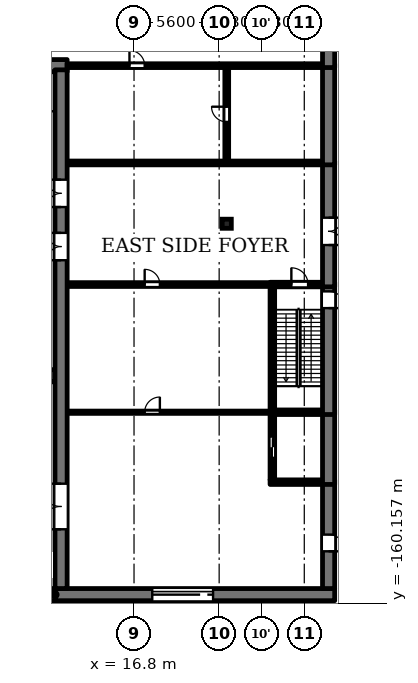
"""IFC4 building model, lengths in metres.
Left out: names, types, materials, properties, quantities, classifications, styles, units other than length and angle.
Written with IfcOpenShell. Run it as: python <this file> out.ifc"""

import sys

from ifc_helpers import new_model, si_unit, direction, frame, frame_2d, origin, origin_2d, place, context, subcontext, project, spatial, rectangle, extrude, element, fill, save


model = new_model("IFC4")
c1 = context("Model", 3, precision=1e-05, world=origin(), true_north=direction((0.0, 1.0)))
c2 = subcontext(c1, "Body", "Model", "MODEL_VIEW")
j1 = project(units=[si_unit("LENGTHUNIT", "METRE"), si_unit("PLANEANGLEUNIT", "RADIAN")], contexts=[c1])
p1 = place(None, origin())
s1 = spatial("IfcSite", under=j1, at=p1, CompositionType="ELEMENT")
p2 = place(p1, origin())
s2 = spatial("IfcBuilding", under=s1, at=p2, CompositionType="ELEMENT")
p3 = place(p2, origin())
s3 = spatial("IfcBuildingStorey", under=s2, at=p3, CompositionType="ELEMENT", Elevation=0.0)
p4 = place(p3, frame((22.9, -135.2, 0.0), z_axis=(0.0, 0.0, 1.0), x_axis=(1.0, 0.0, 0.0)))
e1 = element("IfcColumn", 1, at=p4, inside=s3, PredefinedType="COLUMN", context=c2, shape_type="SweptSolid", body=[
    extrude(rectangle(XDim=0.6, YDim=0.6, at=origin_2d()), origin(), (0.0, 0.0, 1.0), 6.15),
])
p5 = place(p3, frame((-12.4, -159.6, 0.0), z_axis=(0.0, 0.0, 1.0), x_axis=(1.0, 0.0, 0.0)))
e2 = element("IfcWall", 2, at=p5, inside=s3, PredefinedType="SOLIDWALL", context=c2, shape_type="SweptSolid", body=[
    extrude(rectangle(XDim=24.8, YDim=0.8, at=frame_2d((12.4, 0.0))), origin(), (0.0, 0.0, 1.0), 6.5),
])
p6 = place(p3, frame((11.6, -159.6, 0.0), z_axis=(0.0, 0.0, 1.0), x_axis=(1.0, 0.0, 0.0)))
e3 = element("IfcWall", 3, at=p6, inside=s3, PredefinedType="SOLIDWALL", context=c2, shape_type="SweptSolid", body=[
    extrude(rectangle(XDim=18.4, YDim=0.8, at=frame_2d((9.2, 0.0))), origin(), (0.0, 0.0, 1.0), 6.15),
])
p7 = place(p6, frame((6.4, 0.0, 0.0)))
e4 = element("IfcOpeningElement", 4, at=p7, cuts=e3, PredefinedType="OPENING", context=c2, shape_type="SweptSolid", body=[
    extrude(rectangle(XDim=4.0, YDim=4.5, at=frame_2d((2.0, 2.25))), frame((0.0, 0.41, 0.0), z_axis=(0.0, -1.0, 0.0), x_axis=(1.0, 0.0, 0.0)), (0.0, 0.0, 1.0), 0.82),
])
p8 = place(p3, frame((25.75, -152.2, 0.0), z_axis=(0.0, 0.0, 1.0), x_axis=(1.0, 0.0, 0.0)))
e5 = element("IfcWall", 5, at=p8, inside=s3, PredefinedType="SOLIDWALL", context=c2, shape_type="SweptSolid", body=[
    extrude(rectangle(XDim=3.45, YDim=0.3, at=frame_2d((1.725, 0.0))), origin(), (0.0, 0.0, 1.0), 6.15),
])
p9 = place(p3, frame((12.4, -147.6, 0.0), z_axis=(0.0, 0.0, 1.0), x_axis=(1.0, 0.0, 0.0)))
e6 = element("IfcWall", 6, at=p9, inside=s3, PredefinedType="PARTITIONING", context=c2, shape_type="SweptSolid", body=[
    extrude(rectangle(XDim=13.35, YDim=0.15, at=frame_2d((6.675, 0.0))), origin(), (0.0, 0.0, 1.0), 6.15),
])
p10 = place(p9, frame((5.1, 0.0, 0.0)))
e7 = element("IfcOpeningElement", 7, at=p10, cuts=e6, PredefinedType="OPENING", context=c2, shape_type="SweptSolid", body=[
    extrude(rectangle(XDim=1.0, YDim=2.1, at=frame_2d((0.5, 1.05))), frame((0.0, 0.085, 0.0), z_axis=(0.0, -1.0, 0.0), x_axis=(1.0, 0.0, 0.0)), (0.0, 0.0, 1.0), 0.17),
])
p11 = place(p3, frame((26.05, -147.6, 0.0), z_axis=(0.0, 0.0, 1.0), x_axis=(1.0, 0.0, 0.0)))
e8 = element("IfcWall", 8, at=p11, inside=s3, PredefinedType="SOLIDWALL", context=c2, shape_type="SweptSolid", body=[
    extrude(rectangle(XDim=3.15, YDim=0.3, at=frame_2d((1.575, 0.0))), origin(), (0.0, 0.0, 1.0), 6.15),
])
p12 = place(p3, frame((7.0, -145.2, 0.0), z_axis=(0.0, 0.0, 1.0), x_axis=(1.0, 0.0, 0.0)))
e9 = element("IfcWall", 9, at=p12, inside=s3, PredefinedType="SOLIDWALL", context=c2, shape_type="SweptSolid", body=[
    extrude(rectangle(XDim=4.6, YDim=0.8, at=frame_2d((2.3, 0.0))), origin(), (0.0, 0.0, 1.0), 6.5),
])
p13 = place(p3, frame((12.4, -139.2, 0.0), z_axis=(0.0, 0.0, 1.0), x_axis=(1.0, 0.0, 0.0)))
e10 = element("IfcWall", 10, at=p13, inside=s3, PredefinedType="SOLIDWALL", context=c2, shape_type="SweptSolid", body=[
    extrude(rectangle(XDim=13.35, YDim=0.25, at=frame_2d((6.675, 0.0))), origin(), (0.0, 0.0, 1.0), 6.15),
])
p14 = place(p13, frame((5.1, 0.0, 0.0)))
e11 = element("IfcOpeningElement", 11, at=p14, cuts=e10, PredefinedType="OPENING", context=c2, shape_type="SweptSolid", body=[
    extrude(rectangle(XDim=1.0, YDim=2.1, at=frame_2d((0.5, 1.05))), frame((0.0, 0.135, 0.0), z_axis=(0.0, -1.0, 0.0), x_axis=(1.0, 0.0, 0.0)), (0.0, 0.0, 1.0), 0.27),
])
p15 = place(p3, frame((25.75, -139.2, 0.0), z_axis=(0.0, 0.0, 1.0), x_axis=(1.0, 0.0, 0.0)))
e12 = element("IfcWall", 12, at=p15, inside=s3, PredefinedType="SOLIDWALL", context=c2, shape_type="SweptSolid", body=[
    extrude(rectangle(XDim=3.45, YDim=0.3, at=frame_2d((1.725, 0.0))), origin(), (0.0, 0.0, 1.0), 6.15),
])
p16 = place(p15, frame((1.4, 0.0, 0.0)))
e13 = element("IfcOpeningElement", 13, at=p16, cuts=e12, PredefinedType="OPENING", context=c2, shape_type="SweptSolid", body=[
    extrude(rectangle(XDim=1.1, YDim=2.1, at=frame_2d((0.55, 1.05))), frame((0.0, 0.16, 0.0), z_axis=(0.0, -1.0, 0.0), x_axis=(1.0, 0.0, 0.0)), (0.0, 0.0, 1.0), 0.32),
])
p17 = place(p3, frame((12.4, -131.2, 0.0), z_axis=(0.0, 0.0, 1.0), x_axis=(1.0, 0.0, 0.0)))
e14 = element("IfcWall", 14, at=p17, inside=s3, PredefinedType="SOLIDWALL", context=c2, shape_type="SweptSolid", body=[
    extrude(rectangle(XDim=16.8, YDim=0.25, at=frame_2d((8.4, 0.0))), origin(), (0.0, 0.0, 1.0), 6.15),
])
p18 = place(p3, frame((-12.4, -124.8, 0.0), z_axis=(0.0, 0.0, 1.0), x_axis=(1.0, 0.0, 0.0)))
e15 = element("IfcWall", 15, at=p18, inside=s3, PredefinedType="SOLIDWALL", context=c2, shape_type="SweptSolid", body=[
    extrude(rectangle(XDim=24.8, YDim=0.8, at=frame_2d((12.4, 0.0))), origin(), (0.0, 0.0, 1.0), 6.5),
])
p19 = place(p18, frame((2.5, 0.0, 0.0)))
e16 = element("IfcOpeningElement", 16, at=p19, cuts=e15, PredefinedType="OPENING", context=c2, shape_type="SweptSolid", body=[
    extrude(rectangle(XDim=1.8, YDim=2.2, at=frame_2d((0.9, 1.1))), frame((0.0, 0.41, 0.0), z_axis=(0.0, -1.0, 0.0), x_axis=(1.0, 0.0, 0.0)), (0.0, 0.0, 1.0), 0.82),
])
p20 = place(p18, frame((8.5, 0.0, 0.0)))
e17 = element("IfcOpeningElement", 17, at=p20, cuts=e15, PredefinedType="OPENING", context=c2, shape_type="SweptSolid", body=[
    extrude(rectangle(XDim=1.8, YDim=2.2, at=frame_2d((0.9, 1.1))), frame((0.0, 0.41, 0.0), z_axis=(0.0, -1.0, 0.0), x_axis=(1.0, 0.0, 0.0)), (0.0, 0.0, 1.0), 0.82),
])
p21 = place(p18, frame((14.5, 0.0, 0.0)))
e18 = element("IfcOpeningElement", 18, at=p21, cuts=e15, PredefinedType="OPENING", context=c2, shape_type="SweptSolid", body=[
    extrude(rectangle(XDim=1.8, YDim=2.2, at=frame_2d((0.9, 1.1))), frame((0.0, 0.41, 0.0), z_axis=(0.0, -1.0, 0.0), x_axis=(1.0, 0.0, 0.0)), (0.0, 0.0, 1.0), 0.82),
])
p22 = place(p18, frame((20.5, 0.0, 0.0)))
e19 = element("IfcOpeningElement", 19, at=p22, cuts=e15, PredefinedType="OPENING", context=c2, shape_type="SweptSolid", body=[
    extrude(rectangle(XDim=1.8, YDim=2.2, at=frame_2d((0.9, 1.1))), frame((0.0, 0.41, 0.0), z_axis=(0.0, -1.0, 0.0), x_axis=(1.0, 0.0, 0.0)), (0.0, 0.0, 1.0), 0.82),
])
p23 = place(p3, frame((12.4, -124.8, 0.0), z_axis=(0.0, 0.0, 1.0), x_axis=(1.0, 0.0, 0.0)))
e20 = element("IfcWall", 20, at=p23, inside=s3, PredefinedType="SOLIDWALL", context=c2, shape_type="SweptSolid", body=[
    extrude(rectangle(XDim=16.8, YDim=0.25, at=frame_2d((8.4, 0.0))), origin(), (0.0, 0.0, 1.0), 6.15),
])
p24 = place(p23, frame((4.1, 0.0, 0.0)))
e21 = element("IfcOpeningElement", 21, at=p24, cuts=e20, PredefinedType="OPENING", context=c2, shape_type="SweptSolid", body=[
    extrude(rectangle(XDim=1.0, YDim=2.1, at=frame_2d((0.5, 1.05))), frame((0.0, 0.135, 0.0), z_axis=(0.0, -1.0, 0.0), x_axis=(1.0, 0.0, 0.0)), (0.0, 0.0, 1.0), 0.27),
])
p25 = place(p3, frame((12.0, -159.2, 0.0), z_axis=(0.0, 0.0, 1.0), x_axis=(0.0, 1.0, 0.0)))
e22 = element("IfcWall", 22, at=p25, inside=s3, PredefinedType="SOLIDWALL", context=c2, shape_type="SweptSolid", body=[
    extrude(rectangle(XDim=34.125, YDim=0.8, at=frame_2d((17.062, 0.0))), origin(), (0.0, 0.0, 1.0), 6.5),
])
p26 = place(p25, frame((21.6, 0.0, 0.0)))
e23 = element("IfcOpeningElement", 23, at=p26, cuts=e22, PredefinedType="OPENING", context=c2, shape_type="SweptSolid", body=[
    extrude(rectangle(XDim=1.8, YDim=2.2, at=frame_2d((0.9, 1.1))), frame((0.0, 0.41, 0.0), z_axis=(0.0, -1.0, 0.0), x_axis=(1.0, 0.0, 0.0)), (0.0, 0.0, 1.0), 0.82),
])
p27 = place(p25, frame((25.1, 0.0, 0.0)))
e24 = element("IfcOpeningElement", 24, at=p27, cuts=e22, PredefinedType="OPENING", context=c2, shape_type="SweptSolid", body=[
    extrude(rectangle(XDim=1.8, YDim=2.2, at=frame_2d((0.9, 1.1))), frame((0.0, 0.41, 0.0), z_axis=(0.0, -1.0, 0.0), x_axis=(1.0, 0.0, 0.0)), (0.0, 0.0, 1.0), 0.82),
])
p28 = place(p25, frame((3.9, 0.0, 0.0)))
e25 = element("IfcOpeningElement", 25, at=p28, cuts=e22, PredefinedType="OPENING", context=c2, shape_type="SweptSolid", body=[
    extrude(rectangle(XDim=3.0, YDim=3.0, at=frame_2d((1.5, 1.5))), frame((0.0, 0.41, 0.0), z_axis=(0.0, -1.0, 0.0), x_axis=(1.0, 0.0, 0.0)), (0.0, 0.0, 1.0), 0.82),
])
p29 = place(p3, frame((22.9, -131.075, 0.0), z_axis=(0.0, 0.0, 1.0), x_axis=(0.0, 1.0, 0.0)))
e26 = element("IfcWall", 26, at=p29, inside=s3, PredefinedType="SOLIDWALL", context=c2, shape_type="SweptSolid", body=[
    extrude(rectangle(XDim=6.15, YDim=0.25, at=frame_2d((3.075, 0.0))), origin(), (0.0, 0.0, 1.0), 6.15),
])
p30 = place(p29, frame((2.575, 0.0, 0.0)))
e27 = element("IfcOpeningElement", 27, at=p30, cuts=e26, PredefinedType="OPENING", context=c2, shape_type="SweptSolid", body=[
    extrude(rectangle(XDim=1.0, YDim=2.1, at=frame_2d((0.5, 1.05))), frame((0.0, 0.135, 0.0), z_axis=(0.0, -1.0, 0.0), x_axis=(1.0, 0.0, 0.0)), (0.0, 0.0, 1.0), 0.27),
])
p31 = place(p3, frame((25.9, -152.05, 0.0), z_axis=(0.0, 0.0, 1.0), x_axis=(0.0, 1.0, 0.0)))
e28 = element("IfcWall", 28, at=p31, inside=s3, PredefinedType="SOLIDWALL", context=c2, shape_type="SweptSolid", body=[
    extrude(rectangle(XDim=12.825, YDim=0.3, at=frame_2d((6.413, 0.0))), origin(), (0.0, 0.0, 1.0), 6.15),
])
p32 = place(p31, frame((1.45, 0.0, 0.0)))
e29 = element("IfcOpeningElement", 29, at=p32, cuts=e28, PredefinedType="OPENING", context=c2, shape_type="SweptSolid", body=[
    extrude(rectangle(XDim=1.4, YDim=2.2, at=frame_2d((0.7, 1.1))), frame((0.0, 0.16, 0.0), z_axis=(0.0, -1.0, 0.0), x_axis=(1.0, 0.0, 0.0)), (0.0, 0.0, 1.0), 0.32),
])
p33 = place(p3, frame((29.6, -152.05, 0.0), z_axis=(0.0, 0.0, 1.0), x_axis=(0.0, -1.0, 0.0)))
e30 = element("IfcWall", 30, at=p33, inside=s3, PredefinedType="SOLIDWALL", context=c2, shape_type="SweptSolid", body=[
    extrude(rectangle(XDim=7.15, YDim=0.8, at=frame_2d((3.575, 0.0))), origin(), (0.0, 0.0, 1.0), 6.15),
])
p34 = place(p33, frame((3.6, 0.0, 0.0)))
e31 = element("IfcOpeningElement", 31, at=p34, cuts=e30, PredefinedType="OPENING", context=c2, shape_type="SweptSolid", body=[
    extrude(rectangle(XDim=1.1, YDim=2.1, at=frame_2d((0.55, 1.05))), frame((0.0, 0.41, 0.0), z_axis=(0.0, -1.0, 0.0), x_axis=(1.0, 0.0, 0.0)), (0.0, 0.0, 1.0), 0.82),
])
p35 = place(p3, frame((29.6, -147.45, 0.0), z_axis=(0.0, 0.0, 1.0), x_axis=(0.0, -1.0, 0.0)))
e32 = element("IfcWall", 32, at=p35, inside=s3, PredefinedType="SOLIDWALL", context=c2, shape_type="SweptSolid", body=[
    extrude(rectangle(XDim=4.9, YDim=0.8, at=frame_2d((2.45, 0.0))), origin(), (0.0, 0.0, 1.0), 6.15),
])
p36 = place(p3, frame((29.6, -139.05, 0.0), z_axis=(0.0, 0.0, 1.0), x_axis=(0.0, -1.0, 0.0)))
e33 = element("IfcWall", 33, at=p36, inside=s3, PredefinedType="SOLIDWALL", context=c2, shape_type="SweptSolid", body=[
    extrude(rectangle(XDim=8.7, YDim=0.8, at=frame_2d((4.35, 0.0))), origin(), (0.0, 0.0, 1.0), 6.15),
])
p37 = place(p36, frame((0.6, 0.0, 0.0)))
e34 = element("IfcOpeningElement", 34, at=p37, cuts=e33, PredefinedType="OPENING", context=c2, shape_type="SweptSolid", body=[
    extrude(rectangle(XDim=1.1, YDim=2.1, at=frame_2d((0.55, 1.05))), frame((0.0, 0.41, 0.0), z_axis=(0.0, -1.0, 0.0), x_axis=(1.0, 0.0, 0.0)), (0.0, 0.0, 1.0), 0.82),
])
p38 = place(p3, frame((29.6, -131.075, 0.0), z_axis=(0.0, 0.0, 1.0), x_axis=(0.0, -1.0, 0.0)))
e35 = element("IfcWall", 35, at=p38, inside=s3, PredefinedType="SOLIDWALL", context=c2, shape_type="SweptSolid", body=[
    extrude(rectangle(XDim=8.275, YDim=0.8, at=frame_2d((4.137, 0.0))), origin(), (0.0, 0.0, 1.0), 6.15),
])
p39 = place(p38, frame((3.725, 0.0, 0.0)))
e36 = element("IfcOpeningElement", 36, at=p39, cuts=e35, PredefinedType="OPENING", context=c2, shape_type="SweptSolid", body=[
    extrude(rectangle(XDim=1.8, YDim=2.1, at=frame_2d((0.9, 1.05))), frame((0.0, 0.41, 0.0), z_axis=(0.0, -1.0, 0.0), x_axis=(1.0, 0.0, 0.0)), (0.0, 0.0, 1.0), 0.82),
])
p40 = place(p3, frame((29.6, -124.675, 0.0), z_axis=(0.0, 0.0, 1.0), x_axis=(0.0, -1.0, 0.0)))
e37 = element("IfcWall", 37, at=p40, inside=s3, PredefinedType="SOLIDWALL", context=c2, shape_type="SweptSolid", body=[
    extrude(rectangle(XDim=6.65, YDim=0.8, at=frame_2d((3.325, 0.0))), origin(), (0.0, 0.0, 1.0), 6.15),
])
p41 = place(p3, frame((29.6, -121.05, 0.0), z_axis=(0.0, 0.0, 1.0), x_axis=(0.0, -1.0, 0.0)))
e38 = element("IfcWall", 38, at=p41, inside=s3, PredefinedType="SOLIDWALL", context=c2, shape_type="SweptSolid", body=[
    extrude(rectangle(XDim=3.875, YDim=0.8, at=frame_2d((1.938, 0.0))), origin(), (0.0, 0.0, 1.0), 6.15),
])
p42 = place(p37, origin())
e39 = element("IfcDoor", 39, at=p42, inside=s3, OperationType="SINGLE_SWING_RIGHT", PredefinedType="DOOR", context=c2, shape_type="SweptSolid", body=[
    extrude(rectangle(XDim=1.1, YDim=2.1, at=frame_2d((0.55, 1.05))), frame((0.0, 0.025, 0.0), z_axis=(0.0, -1.0, 0.0), x_axis=(1.0, 0.0, 0.0)), (0.0, 0.0, 1.0), 0.05),
])
fill(e34, e39)
p43 = place(p39, origin())
e40 = element("IfcDoor", 40, at=p43, inside=s3, OperationType="DOUBLE_DOOR_SINGLE_SWING", PredefinedType="DOOR", context=c2, shape_type="SweptSolid", body=[
    extrude(rectangle(XDim=1.8, YDim=2.1, at=frame_2d((0.9, 1.05))), frame((0.0, 0.025, 0.0), z_axis=(0.0, -1.0, 0.0), x_axis=(1.0, 0.0, 0.0)), (0.0, 0.0, 1.0), 0.05),
])
fill(e36, e40)
p44 = place(p7, origin())
e41 = element("IfcDoor", 41, at=p44, inside=s3, OperationType="ROLLINGUP", PredefinedType="DOOR", context=c2, shape_type="SweptSolid", body=[
    extrude(rectangle(XDim=4.0, YDim=4.5, at=frame_2d((2.0, 2.25))), frame((0.0, 0.025, 0.0), z_axis=(0.0, -1.0, 0.0), x_axis=(1.0, 0.0, 0.0)), (0.0, 0.0, 1.0), 0.05),
])
fill(e4, e41)
p45 = place(p34, origin())
e42 = element("IfcDoor", 42, at=p45, inside=s3, OperationType="SINGLE_SWING_RIGHT", PredefinedType="DOOR", context=c2, shape_type="SweptSolid", body=[
    extrude(rectangle(XDim=1.1, YDim=2.1, at=frame_2d((0.55, 1.05))), frame((0.0, 0.025, 0.0), z_axis=(0.0, -1.0, 0.0), x_axis=(1.0, 0.0, 0.0)), (0.0, 0.0, 1.0), 0.05),
])
fill(e31, e42)
p46 = place(p32, origin())
e43 = element("IfcDoor", 43, at=p46, inside=s3, OperationType="DOUBLE_DOOR_SLIDING", PredefinedType="DOOR", context=c2, shape_type="SweptSolid", body=[
    extrude(rectangle(XDim=1.4, YDim=2.2, at=frame_2d((0.7, 1.1))), frame((0.0, 0.025, 0.0), z_axis=(0.0, -1.0, 0.0), x_axis=(1.0, 0.0, 0.0)), (0.0, 0.0, 1.0), 0.05),
])
fill(e29, e43)
p47 = place(p16, origin())
e44 = element("IfcDoor", 44, at=p47, inside=s3, OperationType="SINGLE_SWING_LEFT", PredefinedType="DOOR", context=c2, shape_type="SweptSolid", body=[
    extrude(rectangle(XDim=1.1, YDim=2.1, at=frame_2d((0.55, 1.05))), frame((0.0, 0.025, 0.0), z_axis=(0.0, -1.0, 0.0), x_axis=(1.0, 0.0, 0.0)), (0.0, 0.0, 1.0), 0.05),
])
fill(e13, e44)
p48 = place(p24, origin())
e45 = element("IfcDoor", 45, at=p48, inside=s3, OperationType="SINGLE_SWING_LEFT", PredefinedType="DOOR", context=c2, shape_type="SweptSolid", body=[
    extrude(rectangle(XDim=1.0, YDim=2.1, at=frame_2d((0.5, 1.05))), frame((0.0, 0.025, 0.0), z_axis=(0.0, -1.0, 0.0), x_axis=(1.0, 0.0, 0.0)), (0.0, 0.0, 1.0), 0.05),
])
fill(e21, e45)
p49 = place(p30, origin())
e46 = element("IfcDoor", 46, at=p49, inside=s3, OperationType="SINGLE_SWING_RIGHT", PredefinedType="DOOR", context=c2, shape_type="SweptSolid", body=[
    extrude(rectangle(XDim=1.0, YDim=2.1, at=frame_2d((0.5, 1.05))), frame((0.0, 0.025, 0.0), z_axis=(0.0, -1.0, 0.0), x_axis=(1.0, 0.0, 0.0)), (0.0, 0.0, 1.0), 0.05),
])
fill(e27, e46)
p50 = place(p26, origin())
e47 = element("IfcDoor", 47, at=p50, inside=s3, OperationType="DOUBLE_DOOR_SINGLE_SWING", PredefinedType="DOOR", context=c2, shape_type="SweptSolid", body=[
    extrude(rectangle(XDim=1.8, YDim=2.2, at=frame_2d((0.9, 1.1))), frame((0.0, 0.025, 0.0), z_axis=(0.0, -1.0, 0.0), x_axis=(1.0, 0.0, 0.0)), (0.0, 0.0, 1.0), 0.05),
])
fill(e23, e47)
p51 = place(p27, origin())
e48 = element("IfcDoor", 48, at=p51, inside=s3, OperationType="DOUBLE_DOOR_SINGLE_SWING", PredefinedType="DOOR", context=c2, shape_type="SweptSolid", body=[
    extrude(rectangle(XDim=1.8, YDim=2.2, at=frame_2d((0.9, 1.1))), frame((0.0, 0.025, 0.0), z_axis=(0.0, -1.0, 0.0), x_axis=(1.0, 0.0, 0.0)), (0.0, 0.0, 1.0), 0.05),
])
fill(e24, e48)
p52 = place(p14, origin())
e49 = element("IfcDoor", 49, at=p52, inside=s3, OperationType="SINGLE_SWING_LEFT", PredefinedType="DOOR", context=c2, shape_type="SweptSolid", body=[
    extrude(rectangle(XDim=1.0, YDim=2.1, at=frame_2d((0.5, 1.05))), frame((0.0, 0.025, 0.0), z_axis=(0.0, -1.0, 0.0), x_axis=(1.0, 0.0, 0.0)), (0.0, 0.0, 1.0), 0.05),
])
fill(e11, e49)
p53 = place(p10, origin())
e50 = element("IfcDoor", 50, at=p53, inside=s3, OperationType="SINGLE_SWING_RIGHT", PredefinedType="DOOR", context=c2, shape_type="SweptSolid", body=[
    extrude(rectangle(XDim=1.0, YDim=2.1, at=frame_2d((0.5, 1.05))), frame((0.0, 0.025, 0.0), z_axis=(0.0, -1.0, 0.0), x_axis=(1.0, 0.0, 0.0)), (0.0, 0.0, 1.0), 0.05),
])
fill(e7, e50)
p54 = place(p28, origin())
e51 = element("IfcDoor", 51, at=p54, inside=s3, OperationType="DOUBLE_DOOR_DOUBLE_SWING", PredefinedType="DOOR", context=c2, shape_type="SweptSolid", body=[
    extrude(rectangle(XDim=3.0, YDim=3.0, at=frame_2d((1.5, 1.5))), frame((0.0, 0.025, 0.0), z_axis=(0.0, -1.0, 0.0), x_axis=(1.0, 0.0, 0.0)), (0.0, 0.0, 1.0), 0.05),
])
fill(e25, e51)
save(model, sys.argv[1])
